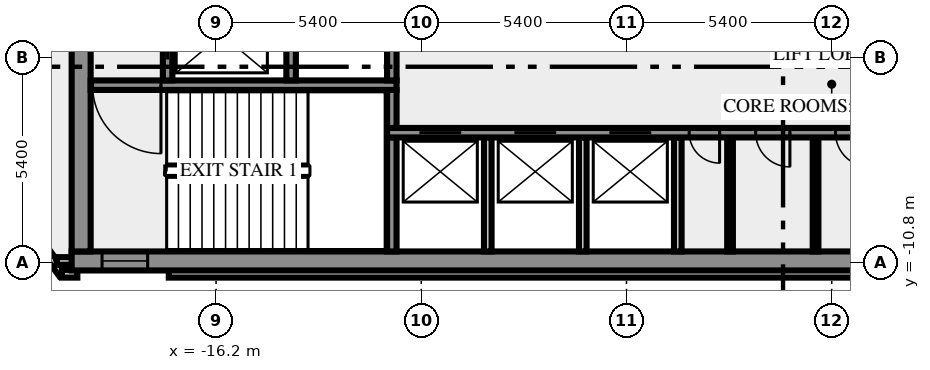
"""IFC4 building model, lengths in metres.
Left out: names, types, materials, properties, quantities, classifications, styles, units other than length and angle.
Written with IfcOpenShell. Run it as: python <this file> out.ifc"""

import sys

from ifc_helpers import new_model, si_unit, direction, frame, frame_2d, origin, place, context, subcontext, project, spatial, rectangle, extrude, element, fill, save


model = new_model("IFC4")
c1 = context("Model", 3, precision=1e-05, world=origin(), true_north=direction((0.0, 1.0)))
c2 = subcontext(c1, "Body", "Model", "MODEL_VIEW")
j1 = project(units=[si_unit("LENGTHUNIT", "METRE"), si_unit("PLANEANGLEUNIT", "RADIAN")], contexts=[c1])
p1 = place(None, origin())
s1 = spatial("IfcSite", under=j1, at=p1, CompositionType="ELEMENT")
p2 = place(p1, origin())
s2 = spatial("IfcBuilding", under=s1, at=p2, CompositionType="ELEMENT")
p3 = place(p2, frame((0.0, 0.0, 105.0)))
s3 = spatial("IfcBuildingStorey", under=s2, at=p3, CompositionType="ELEMENT", Elevation=105.0)
p4 = place(p3, frame((-21.833, -8.909, 0.0), z_axis=(0.0, 0.0, 1.0), x_axis=(0.587766567315, -0.809030569476, 0.0)))
e1 = element("IfcWall", 1, at=p4, inside=s3, PredefinedType="SOLIDWALL", context=c2, shape_type="SweptSolid", body=[
    extrude(rectangle(XDim=2.688, YDim=0.2, at=frame_2d((1.344, 0.0))), origin(), (0.0, 0.0, 1.0), 3.65),
])
p5 = place(p3, frame((-20.256, -11.088, 0.0), z_axis=(0.0, 0.0, 1.0), x_axis=(1.0, 0.0, 0.0)))
e2 = element("IfcWall", 2, at=p5, inside=s3, PredefinedType="SOLIDWALL", context=c2, shape_type="SweptSolid", body=[
    extrude(rectangle(XDim=0.406, YDim=0.2, at=frame_2d((0.203, 0.0))), origin(), (0.0, 0.0, 1.0), 3.65),
])
p6 = place(p3, frame((-17.444, -11.088, 0.0), z_axis=(0.0, 0.0, 1.0), x_axis=(1.0, 0.0, 0.0)))
e3 = element("IfcWall", 3, at=p6, inside=s3, PredefinedType="SOLIDWALL", context=c2, shape_type="SweptSolid", body=[
    extrude(rectangle(XDim=34.888, YDim=0.2, at=frame_2d((17.444, 0.0))), origin(), (0.0, 0.0, 1.0), 3.65),
])
p7 = place(p3, frame((-19.98, -10.75, 0.0), z_axis=(0.0, 0.0, 1.0), x_axis=(-1.0, 0.0, 0.0)))
e4 = element("IfcWall", 4, at=p7, inside=s3, PredefinedType="SOLIDWALL", context=c2, shape_type="SweptSolid", body=[
    extrude(rectangle(XDim=0.417, YDim=0.2, at=frame_2d((0.208, 0.0))), origin(), (0.0, 0.0, 1.0), 3.65),
])
p8 = place(p3, frame((-20.0, -10.75, 0.0), z_axis=(0.0, 0.0, 1.0), x_axis=(1.0, 0.0, 0.0)))
e5 = element("IfcWall", 5, at=p8, inside=s3, PredefinedType="SHEAR", context=c2, shape_type="SweptSolid", body=[
    extrude(rectangle(XDim=40.0, YDim=0.5, at=frame_2d((20.0, 0.0))), origin(), (0.0, 0.0, 1.0), 3.65),
])
p9 = place(p8, frame((0.8, 0.0, 1.0)))
e6 = element("IfcOpeningElement", 6, at=p9, cuts=e5, PredefinedType="OPENING", context=c2, shape_type="SweptSolid", body=[
    extrude(rectangle(XDim=1.2, YDim=1.2, at=frame_2d((0.6, 0.6))), frame((0.0, 0.26, 0.0), z_axis=(0.0, -1.0, 0.0), x_axis=(1.0, 0.0, 0.0)), (0.0, 0.0, 1.0), 0.52),
])
p10 = place(p8, frame((38.0, 0.0, 1.0)))
e7 = element("IfcOpeningElement", 7, at=p10, cuts=e5, PredefinedType="OPENING", context=c2, shape_type="SweptSolid", body=[
    extrude(rectangle(XDim=1.2, YDim=1.2, at=frame_2d((0.6, 0.6))), frame((0.0, 0.26, 0.0), z_axis=(0.0, -1.0, 0.0), x_axis=(1.0, 0.0, 0.0)), (0.0, 0.0, 1.0), 0.52),
])
p11 = place(p3, frame((-19.75, -10.5, 0.0), z_axis=(0.0, 0.0, 1.0), x_axis=(0.0, 1.0, 0.0)))
e8 = element("IfcWall", 8, at=p11, inside=s3, PredefinedType="SHEAR", context=c2, shape_type="SweptSolid", body=[
    extrude(rectangle(XDim=8.8, YDim=0.5, at=frame_2d((4.4, 0.0))), origin(), (0.0, 0.0, 1.0), 3.65),
])
p12 = place(p3, frame((-11.575, -10.5, 0.0), z_axis=(0.0, 0.0, 1.0), x_axis=(0.0, 1.0, 0.0)))
e9 = element("IfcWall", 9, at=p12, inside=s3, PredefinedType="SHEAR", context=c2, shape_type="SweptSolid", body=[
    extrude(rectangle(XDim=3.0, YDim=0.25, at=frame_2d((1.5, 0.0))), origin(), (0.0, 0.0, 1.0), 3.65),
])
for number, where, z_axis, x_axis in (
    (10, (-9.05, -10.5, 0.0), (0.0, 0.0, 1.0), (0.0, 1.0, 0.0)),
    (11, (-6.55, -10.5, 0.0), (0.0, 0.0, 1.0), (0.0, 1.0, 0.0)),
    (12, (-4.05, -10.5, 0.0), (0.0, 0.0, 1.0), (0.0, 1.0, 0.0)),
):
    element("IfcWall", number, at=place(p3, frame(where, z_axis=z_axis, x_axis=x_axis)), inside=s3, PredefinedType="SOLIDWALL", context=c2, shape_type="SweptSolid", body=[
        extrude(rectangle(XDim=3.0, YDim=0.2, at=frame_2d((1.5, 0.0))), origin(), (0.0, 0.0, 1.0), 3.65),
    ])
for number, where, z_axis, x_axis in (
    (13, (-2.675, -10.5, 0.0), (0.0, 0.0, 1.0), (0.0, 1.0, 0.0)),
    (14, (-0.425, -10.5, 0.0), (0.0, 0.0, 1.0), (0.0, 1.0, 0.0)),
):
    element("IfcWall", number, at=place(p3, frame(where, z_axis=z_axis, x_axis=x_axis)), inside=s3, PredefinedType="PARTITIONING", context=c2, shape_type="SweptSolid", body=[
        extrude(rectangle(XDim=3.0, YDim=0.15, at=frame_2d((1.5, 0.0))), origin(), (0.0, 0.0, 1.0), 3.65),
    ])
p13 = place(p3, frame((11.7, -7.375, 0.0), z_axis=(0.0, 0.0, 1.0), x_axis=(-1.0, 0.0, 0.0)))
e15 = element("IfcWall", 15, at=p13, inside=s3, PredefinedType="SHEAR", context=c2, shape_type="SweptSolid", body=[
    extrude(rectangle(XDim=23.4, YDim=0.25, at=frame_2d((11.7, 0.0))), origin(), (0.0, 0.0, 1.0), 3.65),
])
p14 = place(p13, frame((21.45, 0.0, 0.0)))
e16 = element("IfcOpeningElement", 16, at=p14, cuts=e15, PredefinedType="OPENING", context=c2, shape_type="SweptSolid", body=[
    extrude(rectangle(XDim=1.1, YDim=2.1, at=frame_2d((0.55, 1.05))), frame((0.0, 0.135, 0.0), z_axis=(0.0, -1.0, 0.0), x_axis=(1.0, 0.0, 0.0)), (0.0, 0.0, 1.0), 0.27),
])
p15 = place(p13, frame((18.95, 0.0, 0.0)))
e17 = element("IfcOpeningElement", 17, at=p15, cuts=e15, PredefinedType="OPENING", context=c2, shape_type="SweptSolid", body=[
    extrude(rectangle(XDim=1.1, YDim=2.1, at=frame_2d((0.55, 1.05))), frame((0.0, 0.135, 0.0), z_axis=(0.0, -1.0, 0.0), x_axis=(1.0, 0.0, 0.0)), (0.0, 0.0, 1.0), 0.27),
])
p16 = place(p13, frame((16.45, 0.0, 0.0)))
e18 = element("IfcOpeningElement", 18, at=p16, cuts=e15, PredefinedType="OPENING", context=c2, shape_type="SweptSolid", body=[
    extrude(rectangle(XDim=1.1, YDim=2.1, at=frame_2d((0.55, 1.05))), frame((0.0, 0.135, 0.0), z_axis=(0.0, -1.0, 0.0), x_axis=(1.0, 0.0, 0.0)), (0.0, 0.0, 1.0), 0.27),
])
p17 = place(p13, frame((14.65, 0.0, 0.0)))
e19 = element("IfcOpeningElement", 19, at=p17, cuts=e15, PredefinedType="OPENING", context=c2, shape_type="SweptSolid", body=[
    extrude(rectangle(XDim=0.8, YDim=2.1, at=frame_2d((0.4, 1.05))), frame((0.0, 0.135, 0.0), z_axis=(0.0, -1.0, 0.0), x_axis=(1.0, 0.0, 0.0)), (0.0, 0.0, 1.0), 0.27),
])
p18 = place(p13, frame((12.8, 0.0, 0.0)))
e20 = element("IfcOpeningElement", 20, at=p18, cuts=e15, PredefinedType="OPENING", context=c2, shape_type="SweptSolid", body=[
    extrude(rectangle(XDim=0.9, YDim=2.1, at=frame_2d((0.45, 1.05))), frame((0.0, 0.135, 0.0), z_axis=(0.0, -1.0, 0.0), x_axis=(1.0, 0.0, 0.0)), (0.0, 0.0, 1.0), 0.27),
])
p19 = place(p13, frame((10.7, 0.0, 0.0)))
e21 = element("IfcOpeningElement", 21, at=p19, cuts=e15, PredefinedType="OPENING", context=c2, shape_type="SweptSolid", body=[
    extrude(rectangle(XDim=0.9, YDim=2.1, at=frame_2d((0.45, 1.05))), frame((0.0, 0.135, 0.0), z_axis=(0.0, -1.0, 0.0), x_axis=(1.0, 0.0, 0.0)), (0.0, 0.0, 1.0), 0.27),
])
p20 = place(p3, frame((-11.575, -7.25, 0.0), z_axis=(0.0, 0.0, 1.0), x_axis=(0.0, 1.0, 0.0)))
e22 = element("IfcWall", 22, at=p20, inside=s3, PredefinedType="SHEAR", context=c2, shape_type="SweptSolid", body=[
    extrude(rectangle(XDim=1.0, YDim=0.25, at=frame_2d((0.5, 0.0))), origin(), (0.0, 0.0, 1.0), 3.65),
])
p21 = place(p3, frame((-11.45, -6.125, 0.0), z_axis=(0.0, 0.0, 1.0), x_axis=(-1.0, 0.0, 0.0)))
e23 = element("IfcWall", 23, at=p21, inside=s3, PredefinedType="SHEAR", context=c2, shape_type="SweptSolid", body=[
    extrude(rectangle(XDim=8.05, YDim=0.25, at=frame_2d((4.025, 0.0))), origin(), (0.0, 0.0, 1.0), 3.65),
])
p22 = place(p21, frame((6.2, 0.0, 0.0)))
e24 = element("IfcOpeningElement", 24, at=p22, cuts=e23, PredefinedType="OPENING", context=c2, shape_type="SweptSolid", body=[
    extrude(rectangle(XDim=1.8, YDim=2.1, at=frame_2d((0.9, 1.05))), frame((0.0, 0.135, 0.0), z_axis=(0.0, -1.0, 0.0), x_axis=(1.0, 0.0, 0.0)), (0.0, 0.0, 1.0), 0.27),
])
p23 = place(p3, frame((-17.475, -6.0, 0.0), z_axis=(0.0, 0.0, 1.0), x_axis=(0.0, 1.0, 0.0)))
e25 = element("IfcWall", 25, at=p23, inside=s3, PredefinedType="SHEAR", context=c2, shape_type="SweptSolid", body=[
    extrude(rectangle(XDim=4.3, YDim=0.25, at=frame_2d((2.15, 0.0))), origin(), (0.0, 0.0, 1.0), 3.65),
])
p24 = place(p23, frame((0.55, 0.0, 0.0)))
e26 = element("IfcOpeningElement", 26, at=p24, cuts=e25, PredefinedType="OPENING", context=c2, shape_type="SweptSolid", body=[
    extrude(rectangle(XDim=1.3, YDim=2.1, at=frame_2d((0.65, 1.05))), frame((0.0, 0.135, 0.0), z_axis=(0.0, -1.0, 0.0), x_axis=(1.0, 0.0, 0.0)), (0.0, 0.0, 1.0), 0.27),
])
for number, where, z_axis, x_axis in (
    (27, (-14.225, -6.0, 0.0), (0.0, 0.0, 1.0), (0.0, 1.0, 0.0)),
    (28, (-11.575, -6.0, 0.0), (0.0, 0.0, 1.0), (0.0, 1.0, 0.0)),
):
    element("IfcWall", number, at=place(p3, frame(where, z_axis=z_axis, x_axis=x_axis)), inside=s3, PredefinedType="SHEAR", context=c2, shape_type="SweptSolid", body=[
        extrude(rectangle(XDim=1.75, YDim=0.25, at=frame_2d((0.875, 0.0))), origin(), (0.0, 0.0, 1.0), 3.65),
    ])
p25 = place(p9, origin())
e29 = element("IfcWindow", 29, at=p25, inside=s3, PartitioningType="SINGLE_PANEL", PredefinedType="WINDOW", context=c2, shape_type="SweptSolid", body=[
    extrude(rectangle(XDim=1.2, YDim=1.2, at=frame_2d((0.6, 0.6))), frame((0.0, 0.03, 0.0), z_axis=(0.0, -1.0, 0.0), x_axis=(1.0, 0.0, 0.0)), (0.0, 0.0, 1.0), 0.06),
])
fill(e6, e29)
p26 = place(p14, origin())
e30 = element("IfcDoor", 30, at=p26, inside=s3, OperationType="DOUBLE_DOOR_SLIDING", PredefinedType="DOOR", context=c2, shape_type="SweptSolid", body=[
    extrude(rectangle(XDim=1.1, YDim=2.1, at=frame_2d((0.55, 1.05))), frame((0.0, 0.025, 0.0), z_axis=(0.0, -1.0, 0.0), x_axis=(1.0, 0.0, 0.0)), (0.0, 0.0, 1.0), 0.05),
])
fill(e16, e30)
p27 = place(p15, origin())
e31 = element("IfcDoor", 31, at=p27, inside=s3, OperationType="DOUBLE_DOOR_SLIDING", PredefinedType="DOOR", context=c2, shape_type="SweptSolid", body=[
    extrude(rectangle(XDim=1.1, YDim=2.1, at=frame_2d((0.55, 1.05))), frame((0.0, 0.025, 0.0), z_axis=(0.0, -1.0, 0.0), x_axis=(1.0, 0.0, 0.0)), (0.0, 0.0, 1.0), 0.05),
])
fill(e17, e31)
p28 = place(p16, origin())
e32 = element("IfcDoor", 32, at=p28, inside=s3, OperationType="DOUBLE_DOOR_SLIDING", PredefinedType="DOOR", context=c2, shape_type="SweptSolid", body=[
    extrude(rectangle(XDim=1.1, YDim=2.1, at=frame_2d((0.55, 1.05))), frame((0.0, 0.025, 0.0), z_axis=(0.0, -1.0, 0.0), x_axis=(1.0, 0.0, 0.0)), (0.0, 0.0, 1.0), 0.05),
])
fill(e18, e32)
p29 = place(p17, origin())
e33 = element("IfcDoor", 33, at=p29, inside=s3, OperationType="SINGLE_SWING_RIGHT", PredefinedType="DOOR", context=c2, shape_type="SweptSolid", body=[
    extrude(rectangle(XDim=0.8, YDim=2.1, at=frame_2d((0.4, 1.05))), frame((0.0, 0.025, 0.0), z_axis=(0.0, -1.0, 0.0), x_axis=(1.0, 0.0, 0.0)), (0.0, 0.0, 1.0), 0.05),
])
fill(e19, e33)
p30 = place(p18, origin())
e34 = element("IfcDoor", 34, at=p30, inside=s3, OperationType="SINGLE_SWING_RIGHT", PredefinedType="DOOR", context=c2, shape_type="SweptSolid", body=[
    extrude(rectangle(XDim=0.9, YDim=2.1, at=frame_2d((0.45, 1.05))), frame((0.0, 0.025, 0.0), z_axis=(0.0, -1.0, 0.0), x_axis=(1.0, 0.0, 0.0)), (0.0, 0.0, 1.0), 0.05),
])
fill(e20, e34)
p31 = place(p19, origin())
e35 = element("IfcDoor", 35, at=p31, inside=s3, OperationType="SINGLE_SWING_LEFT", PredefinedType="DOOR", context=c2, shape_type="SweptSolid", body=[
    extrude(rectangle(XDim=0.9, YDim=2.1, at=frame_2d((0.45, 1.05))), frame((0.0, 0.025, 0.0), z_axis=(0.0, -1.0, 0.0), x_axis=(1.0, 0.0, 0.0)), (0.0, 0.0, 1.0), 0.05),
])
fill(e21, e35)
p32 = place(p22, origin())
e36 = element("IfcDoor", 36, at=p32, inside=s3, OperationType="DOUBLE_DOOR_SINGLE_SWING", PredefinedType="DOOR", context=c2, shape_type="SweptSolid", body=[
    extrude(rectangle(XDim=1.8, YDim=2.1, at=frame_2d((0.9, 1.05))), frame((0.0, 0.025, 0.0), z_axis=(0.0, -1.0, 0.0), x_axis=(1.0, 0.0, 0.0)), (0.0, 0.0, 1.0), 0.05),
])
fill(e24, e36)
p33 = place(p24, origin())
e37 = element("IfcDoor", 37, at=p33, inside=s3, OperationType="DOUBLE_DOOR_SLIDING", PredefinedType="DOOR", context=c2, shape_type="SweptSolid", body=[
    extrude(rectangle(XDim=1.3, YDim=2.1, at=frame_2d((0.65, 1.05))), frame((0.0, 0.025, 0.0), z_axis=(0.0, -1.0, 0.0), x_axis=(1.0, 0.0, 0.0)), (0.0, 0.0, 1.0), 0.05),
])
fill(e26, e37)
save(model, sys.argv[1])
